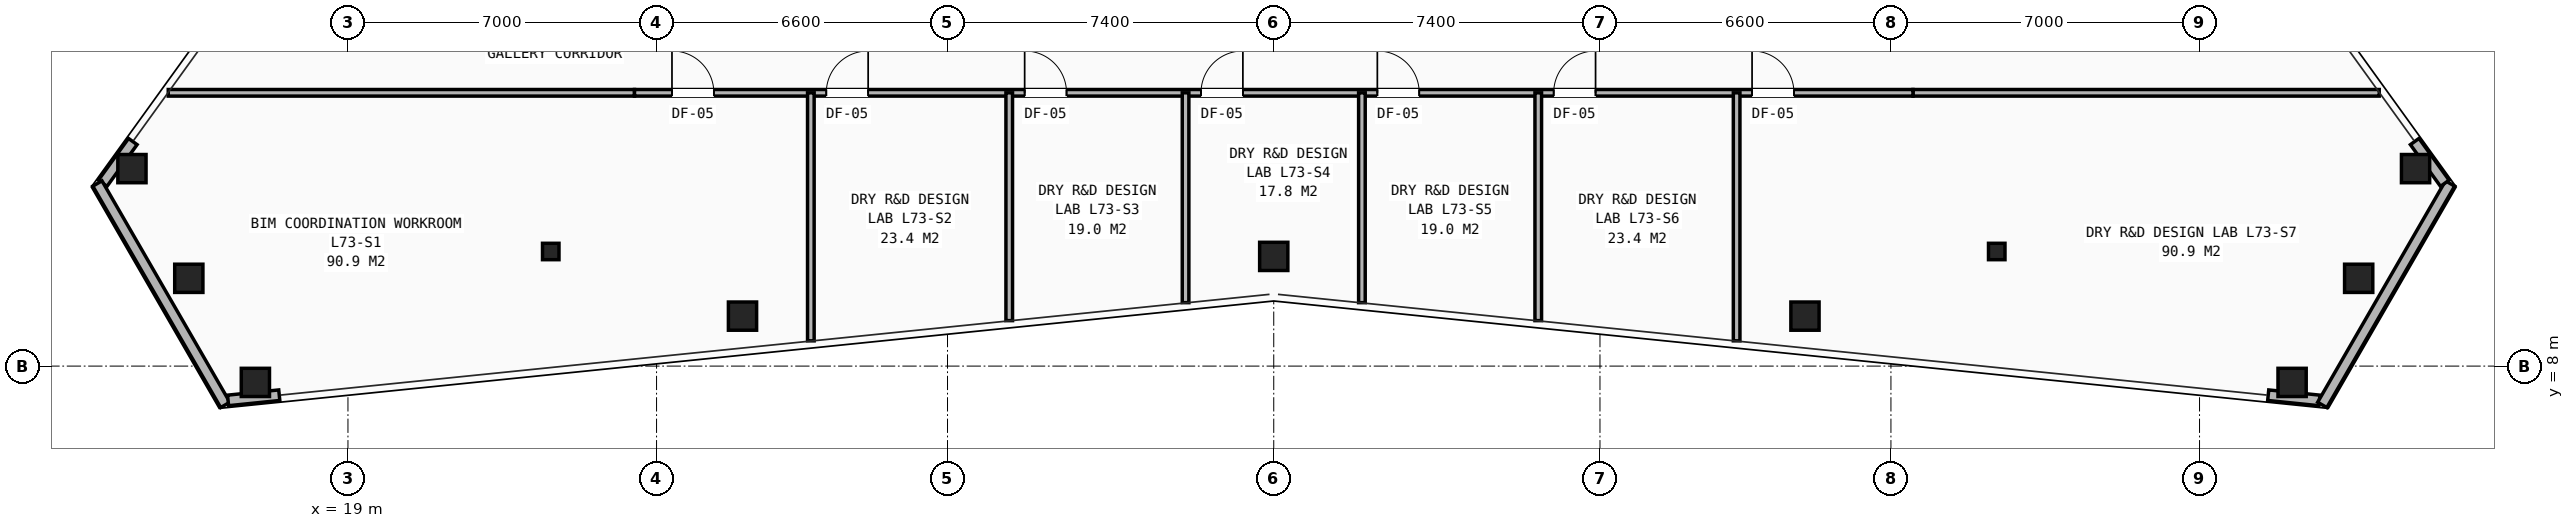
"""IFC4 building model, lengths in metres.
Left out: names, types, materials, properties, quantities, classifications, styles, units other than length and angle.
Written with IfcOpenShell. Run it as: python <this file> out.ifc"""

import sys

from ifc_helpers import new_model, si_unit, direction, frame, frame_2d, origin, origin_2d, place, context, subcontext, project, spatial, rectangle, hollow_rectangle, i_section, extrude, element, fill, save


model = new_model("IFC4")
c1 = context("Model", 3, precision=1e-05, world=origin(), true_north=direction((0.0, 1.0)))
c2 = subcontext(c1, "Body", "Model", "MODEL_VIEW")
j1 = project(units=[si_unit("LENGTHUNIT", "METRE"), si_unit("PLANEANGLEUNIT", "RADIAN")], contexts=[c1])
p1 = place(None, origin())
s1 = spatial("IfcSite", under=j1, at=p1, CompositionType="ELEMENT")
p2 = place(p1, origin())
s2 = spatial("IfcBuilding", under=s1, at=p2, CompositionType="ELEMENT")
p3 = place(p2, frame((0.0, 0.0, 258.5)))
s3 = spatial("IfcBuildingStorey", under=s2, at=p3, CompositionType="ELEMENT", Elevation=258.5)
for number, where, z_axis, x_axis in (
    (1, (23.6, 10.6, 0.0), (0.0, 0.0, 1.0), (1.0, 0.0, 0.0)),
    (2, (56.4, 10.6, 0.0), (0.0, 0.0, 1.0), (1.0, 0.0, 0.0)),
):
    element("IfcColumn", number, at=place(p3, frame(where, z_axis=z_axis, x_axis=x_axis)), inside=s3, PredefinedType="COLUMN", context=c2, shape_type="SweptSolid", body=[
        extrude(i_section(OverallWidth=0.374, OverallDepth=0.372, WebThickness=0.016, FlangeThickness=0.026, at=origin_2d()), origin(), (0.0, 0.0, 1.0), 3.5),
    ])
for number, where, z_axis, x_axis in (
    (3, (14.1, 12.48, 0.0), (0.0, 0.0, 1.0), (1.0, 0.0, 0.0)),
    (4, (15.39, 9.991, 0.0), (0.0, 0.0, 1.0), (1.0, 0.0, 0.0)),
    (5, (16.9, 7.63, 0.0), (0.0, 0.0, 1.0), (1.0, 0.0, 0.0)),
    (6, (27.95, 9.134, 0.0), (0.0, 0.0, 1.0), (1.0, 0.0, 0.0)),
    (7, (40.0, 10.489, 0.0), (0.0, 0.0, 1.0), (1.0, 0.0, 0.0)),
    (8, (52.05, 9.134, 0.0), (0.0, 0.0, 1.0), (1.0, 0.0, 0.0)),
    (9, (63.1, 7.63, 0.0), (0.0, 0.0, 1.0), (1.0, 0.0, 0.0)),
    (10, (64.61, 9.991, 0.0), (0.0, 0.0, 1.0), (1.0, 0.0, 0.0)),
    (11, (65.9, 12.48, 0.0), (0.0, 0.0, 1.0), (1.0, 0.0, 0.0)),
):
    element("IfcColumn", number, at=place(p3, frame(where, z_axis=z_axis, x_axis=x_axis)), inside=s3, PredefinedType="COLUMN", context=c2, shape_type="SweptSolid", body=[
        extrude(hollow_rectangle(XDim=0.64, YDim=0.64, WallThickness=0.045, at=origin_2d()), origin(), (0.0, 0.0, 1.0), 3.5),
    ])
p4 = place(p3, frame((14.12, 13.094, 0.0), z_axis=(0.0, 0.0, 1.0), x_axis=(-0.585108734167, -0.810954850286, 0.0)))
e12 = element("IfcWall", 12, at=p4, inside=s3, PredefinedType="SHEAR", context=c2, shape_type="SweptSolid", body=[
    extrude(rectangle(XDim=1.167, YDim=0.24, at=frame_2d((0.584, 0.0))), origin(), (0.0, 0.0, 1.0), 2.623),
])
p5 = place(p3, frame((16.217, 7.12, 0.0), z_axis=(0.0, 0.0, 1.0), x_axis=(-0.500005459048, 0.866022251978, 0.0)))
e13 = element("IfcWall", 13, at=p5, inside=s3, PredefinedType="SHEAR", context=c2, shape_type="SweptSolid", body=[
    extrude(rectangle(XDim=5.8, YDim=0.24, at=frame_2d((2.9, 0.0))), origin(), (0.0, 0.0, 1.0), 2.623),
])
for number, where, z_axis, x_axis in (
    (14, (16.281, 7.221, 0.0), (0.0, 0.0, 1.0), (0.995, 0.101, 0.0)),
    (15, (62.558, 7.34, 0.0), (0.0, 0.0, 1.0), (0.995, -0.101, 0.0)),
):
    element("IfcWall", number, at=place(p3, frame(where, z_axis=z_axis, x_axis=x_axis)), inside=s3, PredefinedType="SHEAR", context=c2, shape_type="SweptSolid", body=[
        extrude(rectangle(XDim=1.167, YDim=0.24, at=frame_2d((0.584, 0.0))), origin(), (0.0, 0.0, 1.0), 2.623),
    ])
p6 = place(p3, frame((66.683, 12.143, 0.0), z_axis=(0.0, 0.0, 1.0), x_axis=(-0.500005459048, -0.866022251978, 0.0)))
e16 = element("IfcWall", 16, at=p6, inside=s3, PredefinedType="SHEAR", context=c2, shape_type="SweptSolid", body=[
    extrude(rectangle(XDim=5.8, YDim=0.24, at=frame_2d((2.9, 0.0))), origin(), (0.0, 0.0, 1.0), 2.623),
])
p7 = place(p3, frame((66.563, 12.148, 0.0), z_axis=(0.0, 0.0, 1.0), x_axis=(-0.585108734167, 0.810954850286, 0.0)))
e17 = element("IfcWall", 17, at=p7, inside=s3, PredefinedType="SHEAR", context=c2, shape_type="SweptSolid", body=[
    extrude(rectangle(XDim=1.167, YDim=0.24, at=frame_2d((0.584, 0.0))), origin(), (0.0, 0.0, 1.0), 2.623),
])
for number, where, z_axis, x_axis in (
    (18, (14.924, 14.2, 0.0), (0.0, 0.0, 1.0), (1.0, 0.0, 0.0)),
    (19, (54.5, 14.2, 0.0), (0.0, 0.0, 1.0), (1.0, 0.0, 0.0)),
):
    element("IfcWall", number, at=place(p3, frame(where, z_axis=z_axis, x_axis=x_axis)), inside=s3, PredefinedType="PARTITIONING", context=c2, shape_type="SweptSolid", body=[
        extrude(rectangle(XDim=10.576, YDim=0.15, at=frame_2d((5.288, 0.0))), origin(), (0.0, 0.0, 1.0), 2.292),
    ])
p8 = place(p3, frame((25.5, 14.2, 0.0), z_axis=(0.0, 0.0, 1.0), x_axis=(1.0, 0.0, 0.0)))
e20 = element("IfcWall", 20, at=p8, inside=s3, PredefinedType="PARTITIONING", context=c2, shape_type="SweptSolid", body=[
    extrude(rectangle(XDim=29.0, YDim=0.15, at=frame_2d((14.5, 0.0))), origin(), (0.0, 0.0, 1.0), 2.292),
])
p9 = place(p8, frame((0.85, 0.0, 0.0)))
e21 = element("IfcOpeningElement", 21, at=p9, cuts=e20, PredefinedType="OPENING", context=c2, shape_type="SweptSolid", body=[
    extrude(rectangle(XDim=0.95, YDim=2.1, at=frame_2d((0.475, 1.05))), frame((0.0, 0.085, 0.0), z_axis=(0.0, -1.0, 0.0), x_axis=(1.0, 0.0, 0.0)), (0.0, 0.0, 1.0), 0.17),
])
p10 = place(p8, frame((4.35, 0.0, 0.0)))
e22 = element("IfcOpeningElement", 22, at=p10, cuts=e20, PredefinedType="OPENING", context=c2, shape_type="SweptSolid", body=[
    extrude(rectangle(XDim=0.95, YDim=2.1, at=frame_2d((0.475, 1.05))), frame((0.0, 0.085, 0.0), z_axis=(0.0, -1.0, 0.0), x_axis=(1.0, 0.0, 0.0)), (0.0, 0.0, 1.0), 0.17),
])
p11 = place(p8, frame((8.85, 0.0, 0.0)))
e23 = element("IfcOpeningElement", 23, at=p11, cuts=e20, PredefinedType="OPENING", context=c2, shape_type="SweptSolid", body=[
    extrude(rectangle(XDim=0.95, YDim=2.1, at=frame_2d((0.475, 1.05))), frame((0.0, 0.085, 0.0), z_axis=(0.0, -1.0, 0.0), x_axis=(1.0, 0.0, 0.0)), (0.0, 0.0, 1.0), 0.17),
])
p12 = place(p8, frame((12.85, 0.0, 0.0)))
e24 = element("IfcOpeningElement", 24, at=p12, cuts=e20, PredefinedType="OPENING", context=c2, shape_type="SweptSolid", body=[
    extrude(rectangle(XDim=0.95, YDim=2.1, at=frame_2d((0.475, 1.05))), frame((0.0, 0.085, 0.0), z_axis=(0.0, -1.0, 0.0), x_axis=(1.0, 0.0, 0.0)), (0.0, 0.0, 1.0), 0.17),
])
p13 = place(p8, frame((16.85, 0.0, 0.0)))
e25 = element("IfcOpeningElement", 25, at=p13, cuts=e20, PredefinedType="OPENING", context=c2, shape_type="SweptSolid", body=[
    extrude(rectangle(XDim=0.95, YDim=2.1, at=frame_2d((0.475, 1.05))), frame((0.0, 0.085, 0.0), z_axis=(0.0, -1.0, 0.0), x_axis=(1.0, 0.0, 0.0)), (0.0, 0.0, 1.0), 0.17),
])
p14 = place(p8, frame((20.85, 0.0, 0.0)))
e26 = element("IfcOpeningElement", 26, at=p14, cuts=e20, PredefinedType="OPENING", context=c2, shape_type="SweptSolid", body=[
    extrude(rectangle(XDim=0.95, YDim=2.1, at=frame_2d((0.475, 1.05))), frame((0.0, 0.085, 0.0), z_axis=(0.0, -1.0, 0.0), x_axis=(1.0, 0.0, 0.0)), (0.0, 0.0, 1.0), 0.17),
])
p15 = place(p8, frame((25.35, 0.0, 0.0)))
e27 = element("IfcOpeningElement", 27, at=p15, cuts=e20, PredefinedType="OPENING", context=c2, shape_type="SweptSolid", body=[
    extrude(rectangle(XDim=0.95, YDim=2.1, at=frame_2d((0.475, 1.05))), frame((0.0, 0.085, 0.0), z_axis=(0.0, -1.0, 0.0), x_axis=(1.0, 0.0, 0.0)), (0.0, 0.0, 1.0), 0.17),
])
p16 = place(p3, frame((29.5, 8.573, 0.0), z_axis=(0.0, 0.0, 1.0), x_axis=(0.0, 1.0, 0.0)))
e28 = element("IfcWall", 28, at=p16, inside=s3, PredefinedType="PARTITIONING", context=c2, shape_type="SweptSolid", body=[
    extrude(rectangle(XDim=5.627, YDim=0.15, at=frame_2d((2.813, 0.0))), origin(), (0.0, 0.0, 1.0), 2.628),
])
p17 = place(p3, frame((34.0, 9.031, 0.0), z_axis=(0.0, 0.0, 1.0), x_axis=(0.0, 1.0, 0.0)))
e29 = element("IfcWall", 29, at=p17, inside=s3, PredefinedType="PARTITIONING", context=c2, shape_type="SweptSolid", body=[
    extrude(rectangle(XDim=5.168, YDim=0.15, at=frame_2d((2.584, 0.0))), origin(), (0.0, 0.0, 1.0), 2.628),
])
p18 = place(p3, frame((38.0, 9.439, 0.0), z_axis=(0.0, 0.0, 1.0), x_axis=(0.0, 1.0, 0.0)))
e30 = element("IfcWall", 30, at=p18, inside=s3, PredefinedType="PARTITIONING", context=c2, shape_type="SweptSolid", body=[
    extrude(rectangle(XDim=4.761, YDim=0.15, at=frame_2d((2.381, 0.0))), origin(), (0.0, 0.0, 1.0), 2.292),
])
p19 = place(p3, frame((42.0, 9.439, 0.0), z_axis=(0.0, 0.0, 1.0), x_axis=(0.0, 1.0, 0.0)))
e31 = element("IfcWall", 31, at=p19, inside=s3, PredefinedType="PARTITIONING", context=c2, shape_type="SweptSolid", body=[
    extrude(rectangle(XDim=4.761, YDim=0.15, at=frame_2d((2.381, 0.0))), origin(), (0.0, 0.0, 1.0), 2.628),
])
p20 = place(p3, frame((46.0, 9.031, 0.0), z_axis=(0.0, 0.0, 1.0), x_axis=(0.0, 1.0, 0.0)))
e32 = element("IfcWall", 32, at=p20, inside=s3, PredefinedType="PARTITIONING", context=c2, shape_type="SweptSolid", body=[
    extrude(rectangle(XDim=5.168, YDim=0.15, at=frame_2d((2.584, 0.0))), origin(), (0.0, 0.0, 1.0), 2.628),
])
p21 = place(p3, frame((50.5, 8.573, 0.0), z_axis=(0.0, 0.0, 1.0), x_axis=(0.0, 1.0, 0.0)))
e33 = element("IfcWall", 33, at=p21, inside=s3, PredefinedType="PARTITIONING", context=c2, shape_type="SweptSolid", body=[
    extrude(rectangle(XDim=5.627, YDim=0.15, at=frame_2d((2.813, 0.0))), origin(), (0.0, 0.0, 1.0), 2.628),
])
p22 = place(p9, origin())
e34 = element("IfcDoor", 34, at=p22, inside=s3, OperationType="SINGLE_SWING_LEFT", PredefinedType="DOOR", context=c2, shape_type="SweptSolid", body=[
    extrude(rectangle(XDim=0.95, YDim=2.1, at=frame_2d((0.475, 1.05))), frame((0.0, 0.025, 0.0), z_axis=(0.0, -1.0, 0.0), x_axis=(1.0, 0.0, 0.0)), (0.0, 0.0, 1.0), 0.05),
])
fill(e21, e34)
p23 = place(p10, origin())
e35 = element("IfcDoor", 35, at=p23, inside=s3, OperationType="SINGLE_SWING_RIGHT", PredefinedType="DOOR", context=c2, shape_type="SweptSolid", body=[
    extrude(rectangle(XDim=0.95, YDim=2.1, at=frame_2d((0.475, 1.05))), frame((0.0, 0.025, 0.0), z_axis=(0.0, -1.0, 0.0), x_axis=(1.0, 0.0, 0.0)), (0.0, 0.0, 1.0), 0.05),
])
fill(e22, e35)
p24 = place(p11, origin())
e36 = element("IfcDoor", 36, at=p24, inside=s3, OperationType="SINGLE_SWING_LEFT", PredefinedType="DOOR", context=c2, shape_type="SweptSolid", body=[
    extrude(rectangle(XDim=0.95, YDim=2.1, at=frame_2d((0.475, 1.05))), frame((0.0, 0.025, 0.0), z_axis=(0.0, -1.0, 0.0), x_axis=(1.0, 0.0, 0.0)), (0.0, 0.0, 1.0), 0.05),
])
fill(e23, e36)
p25 = place(p12, origin())
e37 = element("IfcDoor", 37, at=p25, inside=s3, OperationType="SINGLE_SWING_RIGHT", PredefinedType="DOOR", context=c2, shape_type="SweptSolid", body=[
    extrude(rectangle(XDim=0.95, YDim=2.1, at=frame_2d((0.475, 1.05))), frame((0.0, 0.025, 0.0), z_axis=(0.0, -1.0, 0.0), x_axis=(1.0, 0.0, 0.0)), (0.0, 0.0, 1.0), 0.05),
])
fill(e24, e37)
p26 = place(p13, origin())
e38 = element("IfcDoor", 38, at=p26, inside=s3, OperationType="SINGLE_SWING_LEFT", PredefinedType="DOOR", context=c2, shape_type="SweptSolid", body=[
    extrude(rectangle(XDim=0.95, YDim=2.1, at=frame_2d((0.475, 1.05))), frame((0.0, 0.025, 0.0), z_axis=(0.0, -1.0, 0.0), x_axis=(1.0, 0.0, 0.0)), (0.0, 0.0, 1.0), 0.05),
])
fill(e25, e38)
p27 = place(p14, origin())
e39 = element("IfcDoor", 39, at=p27, inside=s3, OperationType="SINGLE_SWING_RIGHT", PredefinedType="DOOR", context=c2, shape_type="SweptSolid", body=[
    extrude(rectangle(XDim=0.95, YDim=2.1, at=frame_2d((0.475, 1.05))), frame((0.0, 0.025, 0.0), z_axis=(0.0, -1.0, 0.0), x_axis=(1.0, 0.0, 0.0)), (0.0, 0.0, 1.0), 0.05),
])
fill(e26, e39)
p28 = place(p15, origin())
e40 = element("IfcDoor", 40, at=p28, inside=s3, OperationType="SINGLE_SWING_LEFT", PredefinedType="DOOR", context=c2, shape_type="SweptSolid", body=[
    extrude(rectangle(XDim=0.95, YDim=2.1, at=frame_2d((0.475, 1.05))), frame((0.0, 0.025, 0.0), z_axis=(0.0, -1.0, 0.0), x_axis=(1.0, 0.0, 0.0)), (0.0, 0.0, 1.0), 0.05),
])
fill(e27, e40)
save(model, sys.argv[1])
